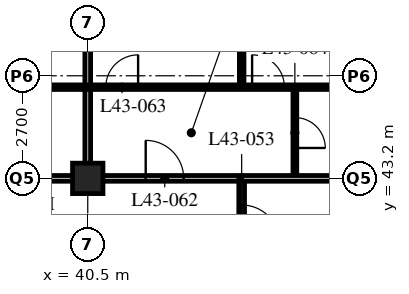
"""IFC4 building model, lengths in metres.
Left out: names, types, materials, properties, quantities, classifications, styles, units other than length and angle.
Written with IfcOpenShell. Run it as: python <this file> out.ifc"""

import sys

from ifc_helpers import new_model, si_unit, direction, frame, frame_2d, origin, origin_2d, place, context, subcontext, project, spatial, rectangle, hollow_rectangle, extrude, element, fill, save


model = new_model("IFC4")
c1 = context("Model", 3, precision=1e-05, world=origin(), true_north=direction((0.0, 1.0)))
c2 = subcontext(c1, "Body", "Model", "MODEL_VIEW")
j1 = project(units=[si_unit("LENGTHUNIT", "METRE"), si_unit("PLANEANGLEUNIT", "RADIAN")], contexts=[c1])
p1 = place(None, origin())
s1 = spatial("IfcSite", under=j1, at=p1, CompositionType="ELEMENT")
p2 = place(p1, origin())
s2 = spatial("IfcBuilding", under=s1, at=p2, CompositionType="ELEMENT")
p3 = place(p2, frame((0.0, 0.0, 170.4)))
s3 = spatial("IfcBuildingStorey", under=s2, at=p3, CompositionType="ELEMENT", Elevation=170.4)
p4 = place(p3, frame((40.5, 43.2, 0.0), z_axis=(0.0, 0.0, 1.0), x_axis=(1.0, 0.0, 0.0)))
e1 = element("IfcColumn", 1, at=p4, inside=s3, PredefinedType="COLUMN", context=c2, shape_type="SweptSolid", body=[
    extrude(hollow_rectangle(XDim=0.8, YDim=0.8, WallThickness=0.08, at=origin_2d()), origin(), (0.0, 0.0, 1.0), 3.6),
])
p5 = place(p3, frame((12.15, 43.2, 0.0), z_axis=(0.0, 0.0, 1.0), x_axis=(1.0, 0.0, 0.0)))
e2 = element("IfcWall", 2, at=p5, inside=s3, PredefinedType="PARTITIONING", context=c2, shape_type="SweptSolid", body=[
    extrude(rectangle(XDim=32.4, YDim=0.15, at=frame_2d((16.2, 0.0))), origin(), (0.0, 0.0, 1.0), 2.778),
])
p6 = place(p5, frame((4.95, 0.0, 0.0)))
e3 = element("IfcOpeningElement", 3, at=p6, cuts=e2, PredefinedType="OPENING", context=c2, shape_type="SweptSolid", body=[
    extrude(rectangle(XDim=1.0, YDim=2.1, at=frame_2d((0.5, 1.05))), frame((0.0, 0.085, 0.0), z_axis=(0.0, -1.0, 0.0), x_axis=(1.0, 0.0, 0.0)), (0.0, 0.0, 1.0), 0.17),
])
p7 = place(p5, frame((13.05, 0.0, 0.0)))
e4 = element("IfcOpeningElement", 4, at=p7, cuts=e2, PredefinedType="OPENING", context=c2, shape_type="SweptSolid", body=[
    extrude(rectangle(XDim=1.0, YDim=2.1, at=frame_2d((0.5, 1.05))), frame((0.0, 0.085, 0.0), z_axis=(0.0, -1.0, 0.0), x_axis=(1.0, 0.0, 0.0)), (0.0, 0.0, 1.0), 0.17),
])
p8 = place(p5, frame((21.15, 0.0, 0.0)))
e5 = element("IfcOpeningElement", 5, at=p8, cuts=e2, PredefinedType="OPENING", context=c2, shape_type="SweptSolid", body=[
    extrude(rectangle(XDim=1.0, YDim=2.1, at=frame_2d((0.5, 1.05))), frame((0.0, 0.085, 0.0), z_axis=(0.0, -1.0, 0.0), x_axis=(1.0, 0.0, 0.0)), (0.0, 0.0, 1.0), 0.17),
])
p9 = place(p5, frame((29.875, 0.0, 0.0)))
e6 = element("IfcOpeningElement", 6, at=p9, cuts=e2, PredefinedType="OPENING", context=c2, shape_type="SweptSolid", body=[
    extrude(rectangle(XDim=1.0, YDim=2.1, at=frame_2d((0.5, 1.05))), frame((0.0, 0.085, 0.0), z_axis=(0.0, -1.0, 0.0), x_axis=(1.0, 0.0, 0.0)), (0.0, 0.0, 1.0), 0.17),
])
p10 = place(p5, frame((1.525, 0.0, 0.0)))
e7 = element("IfcOpeningElement", 7, at=p10, cuts=e2, PredefinedType="OPENING", context=c2, shape_type="SweptSolid", body=[
    extrude(rectangle(XDim=1.0, YDim=2.1, at=frame_2d((0.5, 1.05))), frame((0.0, 0.085, 0.0), z_axis=(0.0, -1.0, 0.0), x_axis=(1.0, 0.0, 0.0)), (0.0, 0.0, 1.0), 0.17),
])
p11 = place(p3, frame((44.55, 18.9, 0.0), z_axis=(0.0, 0.0, 1.0), x_axis=(0.0, 1.0, 0.0)))
e8 = element("IfcWall", 8, at=p11, inside=s3, PredefinedType="PARTITIONING", context=c2, shape_type="SweptSolid", body=[
    extrude(rectangle(XDim=24.3, YDim=0.15, at=frame_2d((12.15, 0.0))), origin(), (0.0, 0.0, 1.0), 3.39),
])
p12 = place(p11, frame((2.35, 0.0, 0.0)))
e9 = element("IfcOpeningElement", 9, at=p12, cuts=e8, PredefinedType="OPENING", context=c2, shape_type="SweptSolid", body=[
    extrude(rectangle(XDim=1.0, YDim=2.1, at=frame_2d((0.5, 1.05))), frame((0.0, 0.085, 0.0), z_axis=(0.0, -1.0, 0.0), x_axis=(1.0, 0.0, 0.0)), (0.0, 0.0, 1.0), 0.17),
])
p13 = place(p11, frame((4.45, 0.0, 0.0)))
e10 = element("IfcOpeningElement", 10, at=p13, cuts=e8, PredefinedType="OPENING", context=c2, shape_type="SweptSolid", body=[
    extrude(rectangle(XDim=1.0, YDim=2.1, at=frame_2d((0.5, 1.05))), frame((0.0, 0.085, 0.0), z_axis=(0.0, -1.0, 0.0), x_axis=(1.0, 0.0, 0.0)), (0.0, 0.0, 1.0), 0.17),
])
p14 = place(p11, frame((18.55, 0.0, 0.0)))
e11 = element("IfcOpeningElement", 11, at=p14, cuts=e8, PredefinedType="OPENING", context=c2, shape_type="SweptSolid", body=[
    extrude(rectangle(XDim=1.0, YDim=2.1, at=frame_2d((0.5, 1.05))), frame((0.0, 0.085, 0.0), z_axis=(0.0, -1.0, 0.0), x_axis=(1.0, 0.0, 0.0)), (0.0, 0.0, 1.0), 0.17),
])
p15 = place(p11, frame((22.6, 0.0, 0.0)))
e12 = element("IfcOpeningElement", 12, at=p15, cuts=e8, PredefinedType="OPENING", context=c2, shape_type="SweptSolid", body=[
    extrude(rectangle(XDim=1.0, YDim=2.1, at=frame_2d((0.5, 1.05))), frame((0.0, 0.085, 0.0), z_axis=(0.0, -1.0, 0.0), x_axis=(1.0, 0.0, 0.0)), (0.0, 0.0, 1.0), 0.17),
])
p16 = place(p3, frame((45.95, 43.2, 0.0), z_axis=(0.0, 0.0, 1.0), x_axis=(0.0, 1.0, 0.0)))
e13 = element("IfcWall", 13, at=p16, inside=s3, PredefinedType="PARTITIONING", context=c2, shape_type="SweptSolid", body=[
    extrude(rectangle(XDim=2.4, YDim=0.1, at=frame_2d((1.2, 0.0))), origin(), (0.0, 0.0, 1.0), 3.39),
])
p17 = place(p16, frame((0.8, 0.0, 0.0)))
e14 = element("IfcOpeningElement", 14, at=p17, cuts=e13, PredefinedType="OPENING", context=c2, shape_type="SweptSolid", body=[
    extrude(rectangle(XDim=0.8, YDim=2.1, at=frame_2d((0.4, 1.05))), frame((0.0, 0.06, 0.0), z_axis=(0.0, -1.0, 0.0), x_axis=(1.0, 0.0, 0.0)), (0.0, 0.0, 1.0), 0.12),
])
p18 = place(p3, frame((44.55, 45.6, 0.0), z_axis=(0.0, 0.0, 1.0), x_axis=(0.0, 1.0, 0.0)))
e15 = element("IfcWall", 15, at=p18, inside=s3, PredefinedType="PARTITIONING", context=c2, shape_type="SweptSolid", body=[
    extrude(rectangle(XDim=13.5, YDim=0.12, at=frame_2d((6.75, 0.0))), origin(), (0.0, 0.0, 1.0), 3.39),
])
p19 = place(p3, frame((44.55, 43.2, 0.0), z_axis=(0.0, 0.0, 1.0), x_axis=(1.0, 0.0, 0.0)))
e16 = element("IfcWall", 16, at=p19, inside=s3, PredefinedType="PARTITIONING", context=c2, shape_type="SweptSolid", body=[
    extrude(rectangle(XDim=11.85, YDim=0.15, at=frame_2d((5.925, 0.0))), origin(), (0.0, 0.0, 1.0), 2.778),
])
p20 = place(p3, frame((40.5, 43.2, 0.0), z_axis=(0.0, 0.0, 1.0), x_axis=(0.0, 1.0, 0.0)))
e17 = element("IfcWall", 17, at=p20, inside=s3, PredefinedType="PARTITIONING", context=c2, shape_type="SweptSolid", body=[
    extrude(rectangle(XDim=15.9, YDim=0.15, at=frame_2d((7.95, 0.0))), origin(), (0.0, 0.0, 1.0), 2.778),
])
p21 = place(p3, frame((8.15, 45.6, 0.0), z_axis=(0.0, 0.0, 1.0), x_axis=(1.0, 0.0, 0.0)))
e18 = element("IfcWall", 18, at=p21, inside=s3, PredefinedType="PARTITIONING", context=c2, shape_type="SweptSolid", body=[
    extrude(rectangle(XDim=40.4, YDim=0.12, at=frame_2d((20.2, 0.0))), origin(), (0.0, 0.0, 1.0), 3.39),
])
p22 = place(p21, frame((9.025, 0.0, 0.0)))
e19 = element("IfcOpeningElement", 19, at=p22, cuts=e18, PredefinedType="OPENING", context=c2, shape_type="SweptSolid", body=[
    extrude(rectangle(XDim=0.85, YDim=2.1, at=frame_2d((0.425, 1.05))), frame((0.0, 0.07, 0.0), z_axis=(0.0, -1.0, 0.0), x_axis=(1.0, 0.0, 0.0)), (0.0, 0.0, 1.0), 0.14),
])
p23 = place(p21, frame((12.425, 0.0, 0.0)))
e20 = element("IfcOpeningElement", 20, at=p23, cuts=e18, PredefinedType="OPENING", context=c2, shape_type="SweptSolid", body=[
    extrude(rectangle(XDim=0.85, YDim=2.1, at=frame_2d((0.425, 1.05))), frame((0.0, 0.07, 0.0), z_axis=(0.0, -1.0, 0.0), x_axis=(1.0, 0.0, 0.0)), (0.0, 0.0, 1.0), 0.14),
])
p24 = place(p21, frame((17.125, 0.0, 0.0)))
e21 = element("IfcOpeningElement", 21, at=p24, cuts=e18, PredefinedType="OPENING", context=c2, shape_type="SweptSolid", body=[
    extrude(rectangle(XDim=0.85, YDim=2.1, at=frame_2d((0.425, 1.05))), frame((0.0, 0.07, 0.0), z_axis=(0.0, -1.0, 0.0), x_axis=(1.0, 0.0, 0.0)), (0.0, 0.0, 1.0), 0.14),
])
p25 = place(p21, frame((20.525, 0.0, 0.0)))
e22 = element("IfcOpeningElement", 22, at=p25, cuts=e18, PredefinedType="OPENING", context=c2, shape_type="SweptSolid", body=[
    extrude(rectangle(XDim=0.85, YDim=2.1, at=frame_2d((0.425, 1.05))), frame((0.0, 0.07, 0.0), z_axis=(0.0, -1.0, 0.0), x_axis=(1.0, 0.0, 0.0)), (0.0, 0.0, 1.0), 0.14),
])
p26 = place(p21, frame((25.225, 0.0, 0.0)))
e23 = element("IfcOpeningElement", 23, at=p26, cuts=e18, PredefinedType="OPENING", context=c2, shape_type="SweptSolid", body=[
    extrude(rectangle(XDim=0.85, YDim=2.1, at=frame_2d((0.425, 1.05))), frame((0.0, 0.07, 0.0), z_axis=(0.0, -1.0, 0.0), x_axis=(1.0, 0.0, 0.0)), (0.0, 0.0, 1.0), 0.14),
])
p27 = place(p21, frame((28.625, 0.0, 0.0)))
e24 = element("IfcOpeningElement", 24, at=p27, cuts=e18, PredefinedType="OPENING", context=c2, shape_type="SweptSolid", body=[
    extrude(rectangle(XDim=0.85, YDim=2.1, at=frame_2d((0.425, 1.05))), frame((0.0, 0.07, 0.0), z_axis=(0.0, -1.0, 0.0), x_axis=(1.0, 0.0, 0.0)), (0.0, 0.0, 1.0), 0.14),
])
p28 = place(p21, frame((32.825, 0.0, 0.0)))
e25 = element("IfcOpeningElement", 25, at=p28, cuts=e18, PredefinedType="OPENING", context=c2, shape_type="SweptSolid", body=[
    extrude(rectangle(XDim=0.85, YDim=2.1, at=frame_2d((0.425, 1.05))), frame((0.0, 0.07, 0.0), z_axis=(0.0, -1.0, 0.0), x_axis=(1.0, 0.0, 0.0)), (0.0, 0.0, 1.0), 0.14),
])
p29 = place(p21, frame((36.675, 0.0, 0.0)))
e26 = element("IfcOpeningElement", 26, at=p29, cuts=e18, PredefinedType="OPENING", context=c2, shape_type="SweptSolid", body=[
    extrude(rectangle(XDim=0.85, YDim=2.1, at=frame_2d((0.425, 1.05))), frame((0.0, 0.07, 0.0), z_axis=(0.0, -1.0, 0.0), x_axis=(1.0, 0.0, 0.0)), (0.0, 0.0, 1.0), 0.14),
])
p30 = place(p21, frame((6.725, 0.0, 0.0)))
e27 = element("IfcOpeningElement", 27, at=p30, cuts=e18, PredefinedType="OPENING", context=c2, shape_type="SweptSolid", body=[
    extrude(rectangle(XDim=0.85, YDim=2.1, at=frame_2d((0.425, 1.05))), frame((0.0, 0.07, 0.0), z_axis=(0.0, -1.0, 0.0), x_axis=(1.0, 0.0, 0.0)), (0.0, 0.0, 1.0), 0.14),
])
p31 = place(p21, frame((2.875, 0.0, 0.0)))
e28 = element("IfcOpeningElement", 28, at=p31, cuts=e18, PredefinedType="OPENING", context=c2, shape_type="SweptSolid", body=[
    extrude(rectangle(XDim=0.85, YDim=2.1, at=frame_2d((0.425, 1.05))), frame((0.0, 0.07, 0.0), z_axis=(0.0, -1.0, 0.0), x_axis=(1.0, 0.0, 0.0)), (0.0, 0.0, 1.0), 0.14),
])
p32 = place(p15, origin())
e29 = element("IfcDoor", 29, at=p32, inside=s3, OperationType="SINGLE_SWING_RIGHT", PredefinedType="DOOR", context=c2, shape_type="SweptSolid", body=[
    extrude(rectangle(XDim=1.0, YDim=2.1, at=frame_2d((0.5, 1.05))), frame((0.0, 0.025, 0.0), z_axis=(0.0, -1.0, 0.0), x_axis=(1.0, 0.0, 0.0)), (0.0, 0.0, 1.0), 0.05),
])
fill(e12, e29)
p33 = place(p9, origin())
e30 = element("IfcDoor", 30, at=p33, inside=s3, OperationType="SINGLE_SWING_LEFT", PredefinedType="DOOR", context=c2, shape_type="SweptSolid", body=[
    extrude(rectangle(XDim=1.0, YDim=2.1, at=frame_2d((0.5, 1.05))), frame((0.0, 0.025, 0.0), z_axis=(0.0, -1.0, 0.0), x_axis=(1.0, 0.0, 0.0)), (0.0, 0.0, 1.0), 0.05),
])
fill(e6, e30)
p34 = place(p28, origin())
e31 = element("IfcDoor", 31, at=p34, inside=s3, OperationType="SINGLE_SWING_RIGHT", PredefinedType="DOOR", context=c2, shape_type="SweptSolid", body=[
    extrude(rectangle(XDim=0.85, YDim=2.1, at=frame_2d((0.425, 1.05))), frame((0.0, 0.025, 0.0), z_axis=(0.0, -1.0, 0.0), x_axis=(1.0, 0.0, 0.0)), (0.0, 0.0, 1.0), 0.05),
])
fill(e25, e31)
p35 = place(p17, origin())
e32 = element("IfcDoor", 32, at=p35, inside=s3, OperationType="SINGLE_SWING_RIGHT", PredefinedType="DOOR", context=c2, shape_type="SweptSolid", body=[
    extrude(rectangle(XDim=0.8, YDim=2.1, at=frame_2d((0.4, 1.05))), frame((0.0, 0.025, 0.0), z_axis=(0.0, -1.0, 0.0), x_axis=(1.0, 0.0, 0.0)), (0.0, 0.0, 1.0), 0.05),
])
fill(e14, e32)
p36 = place(p29, origin())
e33 = element("IfcDoor", 33, at=p36, inside=s3, OperationType="SINGLE_SWING_LEFT", PredefinedType="DOOR", context=c2, shape_type="SweptSolid", body=[
    extrude(rectangle(XDim=0.85, YDim=2.1, at=frame_2d((0.425, 1.05))), frame((0.0, 0.025, 0.0), z_axis=(0.0, -1.0, 0.0), x_axis=(1.0, 0.0, 0.0)), (0.0, 0.0, 1.0), 0.05),
])
fill(e26, e33)
save(model, sys.argv[1])
